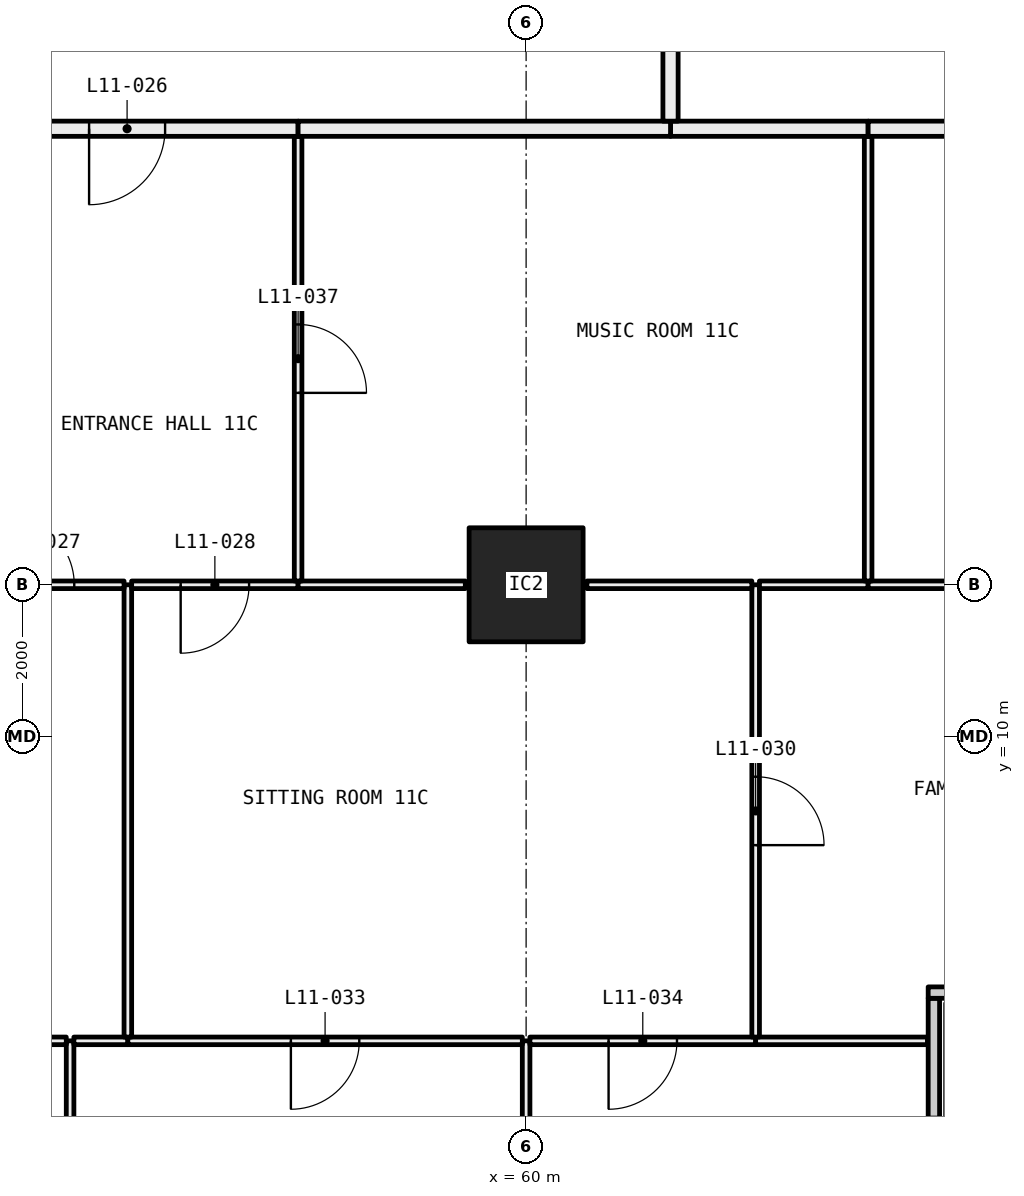
"""IFC4 building model, lengths in metres.
Left out: names, types, materials, properties, quantities, classifications, styles, units other than length and angle.
Written with IfcOpenShell. Run it as: python <this file> out.ifc"""

import sys

from ifc_helpers import new_model, si_unit, direction, frame, frame_2d, origin, origin_2d, place, context, subcontext, project, spatial, rectangle, hollow_rectangle, extrude, element, fill, save


model = new_model("IFC4")
c1 = context("Model", 3, precision=1e-05, world=origin(), true_north=direction((0.0, 1.0)))
c2 = subcontext(c1, "Body", "Model", "MODEL_VIEW")
j1 = project(units=[si_unit("LENGTHUNIT", "METRE"), si_unit("PLANEANGLEUNIT", "RADIAN")], contexts=[c1])
p1 = place(None, origin())
s1 = spatial("IfcSite", under=j1, at=p1, CompositionType="ELEMENT")
p2 = place(p1, origin())
s2 = spatial("IfcBuilding", under=s1, at=p2, CompositionType="ELEMENT")
p3 = place(p2, frame((0.0, 0.0, 50.7)))
s3 = spatial("IfcBuildingStorey", under=s2, at=p3, CompositionType="ELEMENT", Elevation=50.7)
p4 = place(p3, frame((60.0, 12.0, 0.0), z_axis=(0.0, 0.0, 1.0), x_axis=(1.0, 0.0, 0.0)))
e1 = element("IfcColumn", 1, at=p4, inside=s3, PredefinedType="COLUMN", context=c2, shape_type="SweptSolid", body=[
    extrude(hollow_rectangle(XDim=1.5, YDim=1.5, WallThickness=0.065, at=origin_2d()), origin(), (0.0, 0.0, 1.0), 3.05),
])
p5 = place(p3, frame((65.365, 0.71, 0.0), z_axis=(0.0, 0.0, 1.0), x_axis=(0.0, 1.0, 0.0)))
e2 = element("IfcWall", 2, at=p5, inside=s3, PredefinedType="ELEMENTEDWALL", context=c2, shape_type="SweptSolid", body=[
    extrude(rectangle(XDim=5.85, YDim=0.15, at=frame_2d((2.925, 0.0))), origin(), (0.0, 0.0, 1.0), 3.05),
])
p6 = place(p5, frame((0.29, 0.0, 0.45)))
e3 = element("IfcOpeningElement", 3, at=p6, cuts=e2, PredefinedType="OPENING", context=c2, shape_type="SweptSolid", body=[
    extrude(rectangle(XDim=4.0, YDim=2.55, at=frame_2d((2.0, 1.275))), frame((0.0, 0.085, 0.0), z_axis=(0.0, -1.0, 0.0), x_axis=(1.0, 0.0, 0.0)), (0.0, 0.0, 1.0), 0.17),
])
p7 = place(p3, frame((65.29, 6.635, 0.0), z_axis=(0.0, 0.0, 1.0), x_axis=(1.0, 0.0, 0.0)))
e4 = element("IfcWall", 4, at=p7, inside=s3, PredefinedType="ELEMENTEDWALL", context=c2, shape_type="SweptSolid", body=[
    extrude(rectangle(XDim=6.15, YDim=0.15, at=frame_2d((3.075, 0.0))), origin(), (0.0, 0.0, 1.0), 3.05),
])
p8 = place(p7, frame((1.71, 0.0, 0.45)))
e5 = element("IfcOpeningElement", 5, at=p8, cuts=e4, PredefinedType="OPENING", context=c2, shape_type="SweptSolid", body=[
    extrude(rectangle(XDim=4.0, YDim=2.55, at=frame_2d((2.0, 1.275))), frame((0.0, 0.085, 0.0), z_axis=(0.0, -1.0, 0.0), x_axis=(1.0, 0.0, 0.0)), (0.0, 0.0, 1.0), 0.17),
])
p9 = place(p3, frame((54.0, 0.72, 0.0), z_axis=(0.0, 0.0, 1.0), x_axis=(0.0, 1.0, 0.0)))
e6 = element("IfcWall", 6, at=p9, inside=s3, PredefinedType="PARTITIONING", context=c2, shape_type="SweptSolid", body=[
    extrude(rectangle(XDim=5.28, YDim=0.1, at=frame_2d((2.64, 0.0))), origin(), (0.0, 0.0, 1.0), 3.05),
])
p10 = place(p3, frame((53.95, 6.0, 0.0), z_axis=(0.0, 0.0, 1.0), x_axis=(-1.0, 0.0, 0.0)))
e7 = element("IfcWall", 7, at=p10, inside=s3, PredefinedType="PARTITIONING", context=c2, shape_type="SweptSolid", body=[
    extrude(rectangle(XDim=5.9, YDim=0.1, at=frame_2d((2.95, 0.0))), origin(), (0.0, 0.0, 1.0), 2.45),
])
p11 = place(p10, frame((2.5, 0.0, 0.0)))
e8 = element("IfcOpeningElement", 8, at=p11, cuts=e7, PredefinedType="OPENING", context=c2, shape_type="SweptSolid", body=[
    extrude(rectangle(XDim=0.9, YDim=2.1, at=frame_2d((0.45, 1.05))), frame((0.0, 0.06, 0.0), z_axis=(0.0, -1.0, 0.0), x_axis=(1.0, 0.0, 0.0)), (0.0, 0.0, 1.0), 0.12),
])
p12 = place(p3, frame((60.0, 0.72, 0.0), z_axis=(0.0, 0.0, 1.0), x_axis=(0.0, 1.0, 0.0)))
e9 = element("IfcWall", 9, at=p12, inside=s3, PredefinedType="PARTITIONING", context=c2, shape_type="SweptSolid", body=[
    extrude(rectangle(XDim=5.28, YDim=0.1, at=frame_2d((2.64, 0.0))), origin(), (0.0, 0.0, 1.0), 2.45),
])
p13 = place(p3, frame((54.76, 6.0, 0.0), z_axis=(0.0, 0.0, 1.0), x_axis=(-1.0, 0.0, 0.0)))
e10 = element("IfcWall", 10, at=p13, inside=s3, PredefinedType="PARTITIONING", context=c2, shape_type="SweptSolid", body=[
    extrude(rectangle(XDim=0.71, YDim=0.1, at=frame_2d((0.355, 0.0))), origin(), (0.0, 0.0, 1.0), 3.05),
])
p14 = place(p3, frame((59.95, 6.0, 0.0), z_axis=(0.0, 0.0, 1.0), x_axis=(-1.0, 0.0, 0.0)))
e11 = element("IfcWall", 11, at=p14, inside=s3, PredefinedType="PARTITIONING", context=c2, shape_type="SweptSolid", body=[
    extrude(rectangle(XDim=5.19, YDim=0.1, at=frame_2d((2.595, 0.0))), origin(), (0.0, 0.0, 1.0), 2.45),
])
p15 = place(p14, frame((2.145, 0.0, 0.0)))
e12 = element("IfcOpeningElement", 12, at=p15, cuts=e11, PredefinedType="OPENING", context=c2, shape_type="SweptSolid", body=[
    extrude(rectangle(XDim=0.9, YDim=2.1, at=frame_2d((0.45, 1.05))), frame((0.0, 0.06, 0.0), z_axis=(0.0, -1.0, 0.0), x_axis=(1.0, 0.0, 0.0)), (0.0, 0.0, 1.0), 0.12),
])
p16 = place(p3, frame((63.02, 6.0, 0.0), z_axis=(0.0, 0.0, 1.0), x_axis=(-1.0, 0.0, 0.0)))
e13 = element("IfcWall", 13, at=p16, inside=s3, PredefinedType="PARTITIONING", context=c2, shape_type="SweptSolid", body=[
    extrude(rectangle(XDim=2.97, YDim=0.1, at=frame_2d((1.485, 0.0))), origin(), (0.0, 0.0, 1.0), 2.45),
])
p17 = place(p16, frame((1.035, 0.0, 0.0)))
e14 = element("IfcOpeningElement", 14, at=p17, cuts=e13, PredefinedType="OPENING", context=c2, shape_type="SweptSolid", body=[
    extrude(rectangle(XDim=0.9, YDim=2.1, at=frame_2d((0.45, 1.05))), frame((0.0, 0.06, 0.0), z_axis=(0.0, -1.0, 0.0), x_axis=(1.0, 0.0, 0.0)), (0.0, 0.0, 1.0), 0.12),
])
p18 = place(p3, frame((65.28, 6.0, 0.0), z_axis=(0.0, 0.0, 1.0), x_axis=(-1.0, 0.0, 0.0)))
e15 = element("IfcWall", 15, at=p18, inside=s3, PredefinedType="PARTITIONING", context=c2, shape_type="SweptSolid", body=[
    extrude(rectangle(XDim=2.26, YDim=0.1, at=frame_2d((1.13, 0.0))), origin(), (0.0, 0.0, 1.0), 3.05),
])
p19 = place(p3, frame((54.76, 6.05, 0.0), z_axis=(0.0, 0.0, 1.0), x_axis=(0.0, 1.0, 0.0)))
e16 = element("IfcWall", 16, at=p19, inside=s3, PredefinedType="PARTITIONING", context=c2, shape_type="SweptSolid", body=[
    extrude(rectangle(XDim=5.95, YDim=0.1, at=frame_2d((2.975, 0.0))), origin(), (0.0, 0.0, 1.0), 2.45),
])
p20 = place(p3, frame((54.71, 12.0, 0.0), z_axis=(0.0, 0.0, 1.0), x_axis=(-1.0, 0.0, 0.0)))
e17 = element("IfcWall", 17, at=p20, inside=s3, PredefinedType="PARTITIONING", context=c2, shape_type="SweptSolid", body=[
    extrude(rectangle(XDim=2.21, YDim=0.1, at=frame_2d((1.105, 0.0))), origin(), (0.0, 0.0, 1.0), 2.45),
])
p21 = place(p20, frame((0.655, 0.0, 0.0)))
e18 = element("IfcOpeningElement", 18, at=p21, cuts=e17, PredefinedType="OPENING", context=c2, shape_type="SweptSolid", body=[
    extrude(rectangle(XDim=0.9, YDim=2.1, at=frame_2d((0.45, 1.05))), frame((0.0, 0.06, 0.0), z_axis=(0.0, -1.0, 0.0), x_axis=(1.0, 0.0, 0.0)), (0.0, 0.0, 1.0), 0.12),
])
p22 = place(p3, frame((63.02, 6.05, 0.0), z_axis=(0.0, 0.0, 1.0), x_axis=(0.0, 1.0, 0.0)))
e19 = element("IfcWall", 19, at=p22, inside=s3, PredefinedType="PARTITIONING", context=c2, shape_type="SweptSolid", body=[
    extrude(rectangle(XDim=5.95, YDim=0.1, at=frame_2d((2.975, 0.0))), origin(), (0.0, 0.0, 1.0), 2.45),
])
p23 = place(p22, frame((2.525, 0.0, 0.0)))
e20 = element("IfcOpeningElement", 20, at=p23, cuts=e19, PredefinedType="OPENING", context=c2, shape_type="SweptSolid", body=[
    extrude(rectangle(XDim=0.9, YDim=2.1, at=frame_2d((0.45, 1.05))), frame((0.0, 0.06, 0.0), z_axis=(0.0, -1.0, 0.0), x_axis=(1.0, 0.0, 0.0)), (0.0, 0.0, 1.0), 0.12),
])
p24 = place(p3, frame((57.0, 12.0, 0.0), z_axis=(0.0, 0.0, 1.0), x_axis=(-1.0, 0.0, 0.0)))
e21 = element("IfcWall", 21, at=p24, inside=s3, PredefinedType="PARTITIONING", context=c2, shape_type="SweptSolid", body=[
    extrude(rectangle(XDim=2.19, YDim=0.1, at=frame_2d((1.095, 0.0))), origin(), (0.0, 0.0, 1.0), 2.45),
])
p25 = place(p24, frame((0.645, 0.0, 0.0)))
e22 = element("IfcOpeningElement", 22, at=p25, cuts=e21, PredefinedType="OPENING", context=c2, shape_type="SweptSolid", body=[
    extrude(rectangle(XDim=0.9, YDim=2.1, at=frame_2d((0.45, 1.05))), frame((0.0, 0.06, 0.0), z_axis=(0.0, -1.0, 0.0), x_axis=(1.0, 0.0, 0.0)), (0.0, 0.0, 1.0), 0.12),
])
p26 = place(p3, frame((59.2, 12.0, 0.0), z_axis=(0.0, 0.0, 1.0), x_axis=(-1.0, 0.0, 0.0)))
e23 = element("IfcWall", 23, at=p26, inside=s3, PredefinedType="PARTITIONING", context=c2, shape_type="SweptSolid", body=[
    extrude(rectangle(XDim=2.2, YDim=0.1, at=frame_2d((1.1, 0.0))), origin(), (0.0, 0.0, 1.0), 2.45),
])
p27 = place(p3, frame((62.97, 12.0, 0.0), z_axis=(0.0, 0.0, 1.0), x_axis=(-1.0, 0.0, 0.0)))
e24 = element("IfcWall", 24, at=p27, inside=s3, PredefinedType="PARTITIONING", context=c2, shape_type="SweptSolid", body=[
    extrude(rectangle(XDim=2.17, YDim=0.1, at=frame_2d((1.085, 0.0))), origin(), (0.0, 0.0, 1.0), 2.45),
])
p28 = place(p3, frame((64.5, 12.0, 0.0), z_axis=(0.0, 0.0, 1.0), x_axis=(-1.0, 0.0, 0.0)))
e25 = element("IfcWall", 25, at=p28, inside=s3, PredefinedType="PARTITIONING", context=c2, shape_type="SweptSolid", body=[
    extrude(rectangle(XDim=1.43, YDim=0.1, at=frame_2d((0.715, 0.0))), origin(), (0.0, 0.0, 1.0), 2.45),
])
p29 = place(p3, frame((71.28, 12.0, 0.0), z_axis=(0.0, 0.0, 1.0), x_axis=(-1.0, 0.0, 0.0)))
e26 = element("IfcWall", 26, at=p29, inside=s3, PredefinedType="PARTITIONING", context=c2, shape_type="SweptSolid", body=[
    extrude(rectangle(XDim=6.78, YDim=0.1, at=frame_2d((3.39, 0.0))), origin(), (0.0, 0.0, 1.0), 2.45),
])
p30 = place(p29, frame((2.94, 0.0, 0.0)))
e27 = element("IfcOpeningElement", 27, at=p30, cuts=e26, PredefinedType="OPENING", context=c2, shape_type="SweptSolid", body=[
    extrude(rectangle(XDim=0.9, YDim=2.1, at=frame_2d((0.45, 1.05))), frame((0.0, 0.06, 0.0), z_axis=(0.0, -1.0, 0.0), x_axis=(1.0, 0.0, 0.0)), (0.0, 0.0, 1.0), 0.12),
])
p31 = place(p3, frame((57.0, 12.05, 0.0), z_axis=(0.0, 0.0, 1.0), x_axis=(0.0, 1.0, 0.0)))
e28 = element("IfcWall", 28, at=p31, inside=s3, PredefinedType="PARTITIONING", context=c2, shape_type="SweptSolid", body=[
    extrude(rectangle(XDim=5.85, YDim=0.1, at=frame_2d((2.925, 0.0))), origin(), (0.0, 0.0, 1.0), 2.45),
])
p32 = place(p31, frame((2.475, 0.0, 0.0)))
e29 = element("IfcOpeningElement", 29, at=p32, cuts=e28, PredefinedType="OPENING", context=c2, shape_type="SweptSolid", body=[
    extrude(rectangle(XDim=0.9, YDim=2.1, at=frame_2d((0.45, 1.05))), frame((0.0, 0.06, 0.0), z_axis=(0.0, -1.0, 0.0), x_axis=(1.0, 0.0, 0.0)), (0.0, 0.0, 1.0), 0.12),
])
p33 = place(p3, frame((57.0, 18.0, 0.0), z_axis=(0.0, 0.0, 1.0), x_axis=(-1.0, 0.0, 0.0)))
e30 = element("IfcWall", 30, at=p33, inside=s3, PredefinedType="PARTITIONING", context=c2, shape_type="SweptSolid", body=[
    extrude(rectangle(XDim=4.5, YDim=0.2, at=frame_2d((2.25, 0.0))), origin(), (0.0, 0.0, 1.0), 3.05),
])
p34 = place(p33, frame((1.75, 0.0, 0.0)))
e31 = element("IfcOpeningElement", 31, at=p34, cuts=e30, PredefinedType="OPENING", context=c2, shape_type="SweptSolid", body=[
    extrude(rectangle(XDim=1.0, YDim=2.1, at=frame_2d((0.5, 1.05))), frame((0.0, 0.11, 0.0), z_axis=(0.0, -1.0, 0.0), x_axis=(1.0, 0.0, 0.0)), (0.0, 0.0, 1.0), 0.22),
])
p35 = place(p3, frame((64.5, 12.05, 0.0), z_axis=(0.0, 0.0, 1.0), x_axis=(0.0, 1.0, 0.0)))
e32 = element("IfcWall", 32, at=p35, inside=s3, PredefinedType="PARTITIONING", context=c2, shape_type="SweptSolid", body=[
    extrude(rectangle(XDim=5.85, YDim=0.1, at=frame_2d((2.925, 0.0))), origin(), (0.0, 0.0, 1.0), 2.45),
])
p36 = place(p3, frame((64.5, 18.0, 0.0), z_axis=(0.0, 0.0, 1.0), x_axis=(-1.0, 0.0, 0.0)))
e33 = element("IfcWall", 33, at=p36, inside=s3, PredefinedType="PARTITIONING", context=c2, shape_type="SweptSolid", body=[
    extrude(rectangle(XDim=2.6, YDim=0.2, at=frame_2d((1.3, 0.0))), origin(), (0.0, 0.0, 1.0), 3.05),
])
p37 = place(p3, frame((61.9, 18.0, 0.0), z_axis=(0.0, 0.0, 1.0), x_axis=(-1.0, 0.0, 0.0)))
e34 = element("IfcWall", 34, at=p37, inside=s3, PredefinedType="PARTITIONING", context=c2, shape_type="SweptSolid", body=[
    extrude(rectangle(XDim=4.9, YDim=0.2, at=frame_2d((2.45, 0.0))), origin(), (0.0, 0.0, 1.0), 3.05),
])
p38 = place(p3, frame((66.0, 18.0, 0.0), z_axis=(0.0, 0.0, 1.0), x_axis=(-1.0, 0.0, 0.0)))
e35 = element("IfcWall", 35, at=p38, inside=s3, PredefinedType="PARTITIONING", context=c2, shape_type="SweptSolid", body=[
    extrude(rectangle(XDim=1.5, YDim=0.2, at=frame_2d((0.75, 0.0))), origin(), (0.0, 0.0, 1.0), 3.05),
])
p39 = place(p3, frame((61.9, 22.5, 0.0), z_axis=(0.0, 0.0, 1.0), x_axis=(0.0, -1.0, 0.0)))
e36 = element("IfcWall", 36, at=p39, inside=s3, PredefinedType="PARTITIONING", context=c2, shape_type="SweptSolid", body=[
    extrude(rectangle(XDim=4.4, YDim=0.2, at=frame_2d((2.2, 0.0))), origin(), (0.0, 0.0, 1.0), 3.05),
])
p40 = place(p34, origin())
e37 = element("IfcDoor", 37, at=p40, inside=s3, OperationType="SINGLE_SWING_LEFT", PredefinedType="DOOR", context=c2, shape_type="SweptSolid", body=[
    extrude(rectangle(XDim=1.0, YDim=2.1, at=frame_2d((0.5, 1.05))), frame((0.0, 0.025, 0.0), z_axis=(0.0, -1.0, 0.0), x_axis=(1.0, 0.0, 0.0)), (0.0, 0.0, 1.0), 0.05),
])
fill(e31, e37)
p41 = place(p21, frame((0.9, 0.0, 0.0), x_axis=(-1.0, 0.0, 0.0)))
e38 = element("IfcDoor", 38, at=p41, inside=s3, OperationType="SINGLE_SWING_RIGHT", PredefinedType="DOOR", context=c2, shape_type="SweptSolid", body=[
    extrude(rectangle(XDim=0.9, YDim=2.1, at=frame_2d((0.45, 1.05))), frame((0.0, 0.025, 0.0), z_axis=(0.0, -1.0, 0.0), x_axis=(1.0, 0.0, 0.0)), (0.0, 0.0, 1.0), 0.05),
])
fill(e18, e38)
p42 = place(p25, origin())
e39 = element("IfcDoor", 39, at=p42, inside=s3, OperationType="SINGLE_SWING_LEFT", PredefinedType="DOOR", context=c2, shape_type="SweptSolid", body=[
    extrude(rectangle(XDim=0.9, YDim=2.1, at=frame_2d((0.45, 1.05))), frame((0.0, 0.025, 0.0), z_axis=(0.0, -1.0, 0.0), x_axis=(1.0, 0.0, 0.0)), (0.0, 0.0, 1.0), 0.05),
])
fill(e22, e39)
p43 = place(p23, frame((0.9, 0.0, 0.0), x_axis=(-1.0, 0.0, 0.0)))
e40 = element("IfcDoor", 40, at=p43, inside=s3, OperationType="SINGLE_SWING_LEFT", PredefinedType="DOOR", context=c2, shape_type="SweptSolid", body=[
    extrude(rectangle(XDim=0.9, YDim=2.1, at=frame_2d((0.45, 1.05))), frame((0.0, 0.025, 0.0), z_axis=(0.0, -1.0, 0.0), x_axis=(1.0, 0.0, 0.0)), (0.0, 0.0, 1.0), 0.05),
])
fill(e20, e40)
p44 = place(p15, origin())
e41 = element("IfcDoor", 41, at=p44, inside=s3, OperationType="SINGLE_SWING_LEFT", PredefinedType="DOOR", context=c2, shape_type="SweptSolid", body=[
    extrude(rectangle(XDim=0.9, YDim=2.1, at=frame_2d((0.45, 1.05))), frame((0.0, 0.025, 0.0), z_axis=(0.0, -1.0, 0.0), x_axis=(1.0, 0.0, 0.0)), (0.0, 0.0, 1.0), 0.05),
])
fill(e12, e41)
p45 = place(p17, origin())
e42 = element("IfcDoor", 42, at=p45, inside=s3, OperationType="SINGLE_SWING_LEFT", PredefinedType="DOOR", context=c2, shape_type="SweptSolid", body=[
    extrude(rectangle(XDim=0.9, YDim=2.1, at=frame_2d((0.45, 1.05))), frame((0.0, 0.025, 0.0), z_axis=(0.0, -1.0, 0.0), x_axis=(1.0, 0.0, 0.0)), (0.0, 0.0, 1.0), 0.05),
])
fill(e14, e42)
p46 = place(p32, frame((0.9, 0.0, 0.0), x_axis=(-1.0, 0.0, 0.0)))
e43 = element("IfcDoor", 43, at=p46, inside=s3, OperationType="SINGLE_SWING_LEFT", PredefinedType="DOOR", context=c2, shape_type="SweptSolid", body=[
    extrude(rectangle(XDim=0.9, YDim=2.1, at=frame_2d((0.45, 1.05))), frame((0.0, 0.025, 0.0), z_axis=(0.0, -1.0, 0.0), x_axis=(1.0, 0.0, 0.0)), (0.0, 0.0, 1.0), 0.05),
])
fill(e29, e43)
save(model, sys.argv[1])
